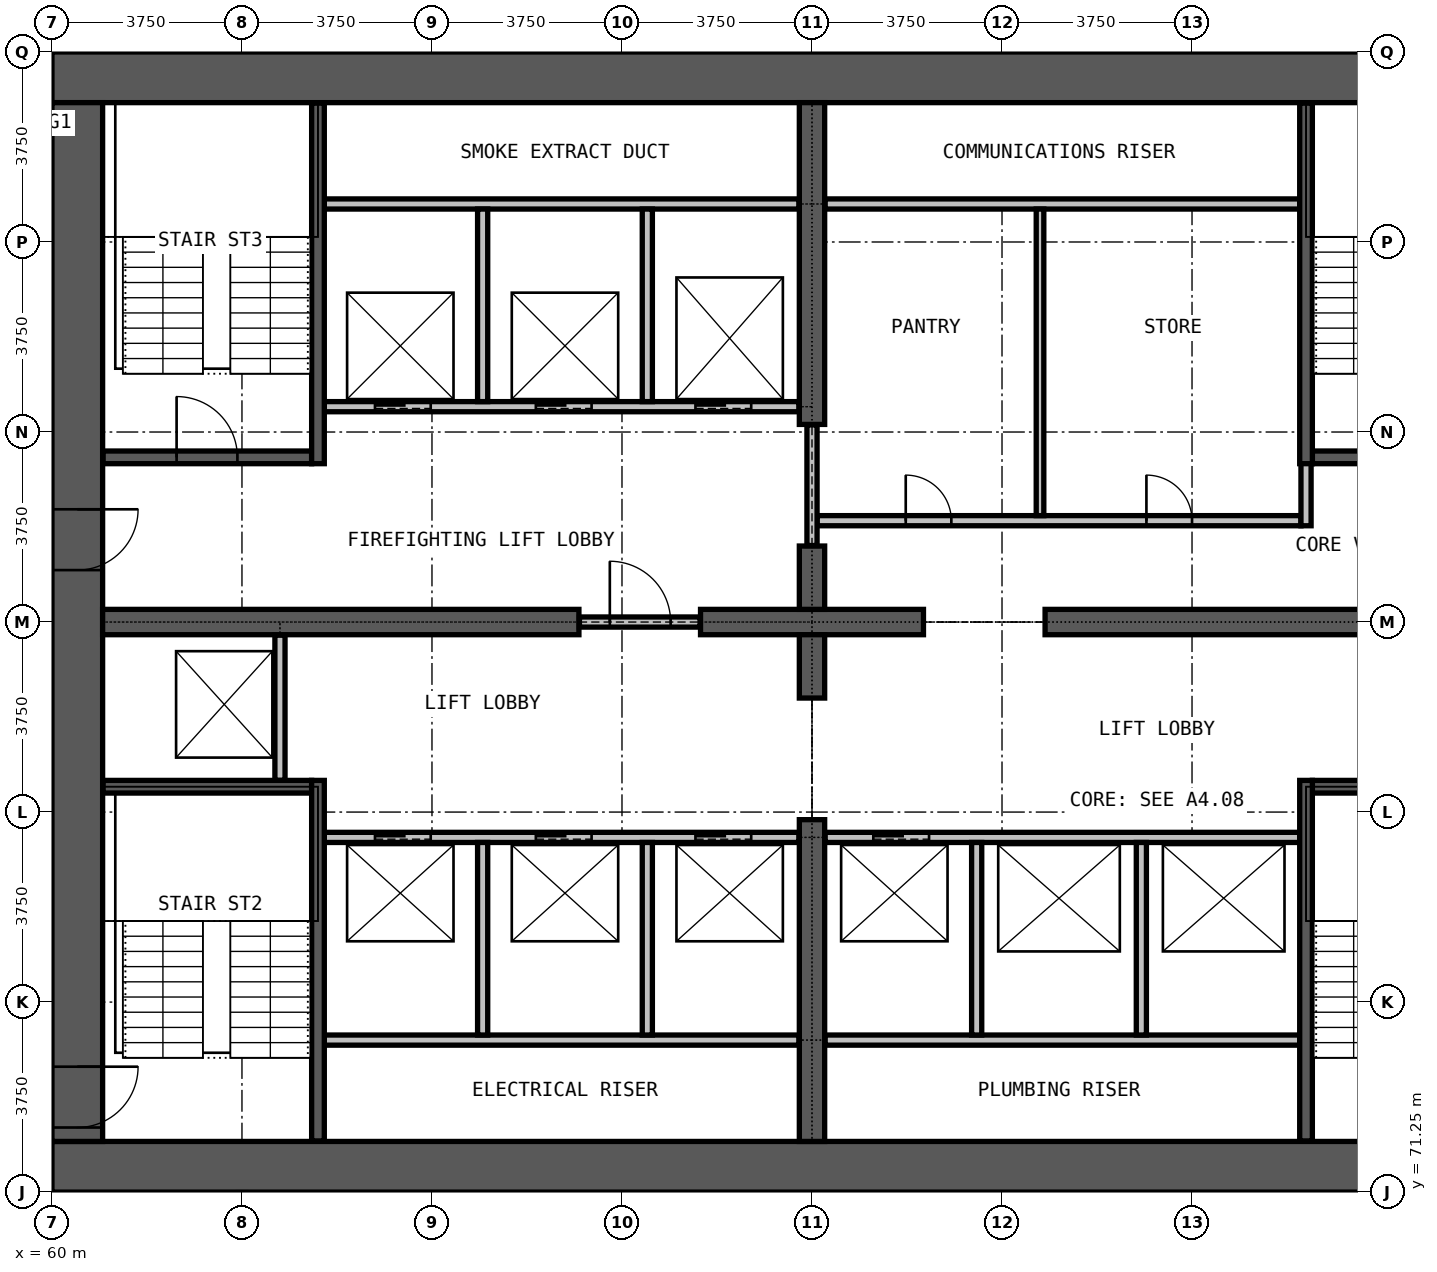
"""IFC4 building model, lengths in metres.
Left out: names, types, materials, properties, quantities, classifications, styles, units other than length and angle.
Written with IfcOpenShell. Run it as: python <this file> out.ifc"""

import sys

from ifc_helpers import new_model, si_unit, direction, frame, frame_2d, origin, place, context, subcontext, project, spatial, rectangle, extrude, element, fill, save


model = new_model("IFC4")
c1 = context("Model", 3, precision=1e-05, world=origin(), true_north=direction((0.0, 1.0)))
c2 = subcontext(c1, "Body", "Model", "MODEL_VIEW")
j1 = project(units=[si_unit("LENGTHUNIT", "METRE"), si_unit("PLANEANGLEUNIT", "RADIAN")], contexts=[c1])
p1 = place(None, origin())
s1 = spatial("IfcSite", under=j1, at=p1, CompositionType="ELEMENT")
p2 = place(p1, origin())
s2 = spatial("IfcBuilding", under=s1, at=p2, CompositionType="ELEMENT")
p3 = place(p2, frame((0.0, 0.0, 42.8)))
s3 = spatial("IfcBuildingStorey", under=s2, at=p3, CompositionType="ELEMENT", Elevation=42.8)
for number, where, z_axis, x_axis in (
    (1, (60.0, 71.75, 0.0), (0.0, 0.0, 1.0), (1.0, 0.0, 0.0)),
    (2, (90.0, 93.25, 0.0), (0.0, 0.0, 1.0), (-1.0, 0.0, 0.0)),
):
    element("IfcWall", number, at=place(p3, frame(where, z_axis=z_axis, x_axis=x_axis)), inside=s3, PredefinedType="SHEAR", context=c2, shape_type="SweptSolid", body=[
        extrude(rectangle(XDim=30.0, YDim=1.0, at=frame_2d((15.0, 0.0))), origin(), (0.0, 0.0, 1.0), 3.3),
    ])
p4 = place(p3, frame((60.5, 92.75, 0.0), z_axis=(0.0, 0.0, 1.0), x_axis=(0.0, -1.0, 0.0)))
e3 = element("IfcWall", 3, at=p4, inside=s3, PredefinedType="SHEAR", context=c2, shape_type="SweptSolid", body=[
    extrude(rectangle(XDim=20.5, YDim=1.0, at=frame_2d((10.25, 0.0))), origin(), (0.0, 0.0, 1.0), 3.3),
])
p5 = place(p4, frame((19.025, 0.0, 0.0)))
e4 = element("IfcOpeningElement", 4, at=p5, cuts=e3, PredefinedType="OPENING", context=c2, shape_type="SweptSolid", body=[
    extrude(rectangle(XDim=1.2, YDim=2.2, at=frame_2d((0.6, 1.1))), frame((0.0, 0.51, 0.0), z_axis=(0.0, -1.0, 0.0), x_axis=(1.0, 0.0, 0.0)), (0.0, 0.0, 1.0), 1.02),
])
p6 = place(p4, frame((8.025, 0.0, 0.0)))
e5 = element("IfcOpeningElement", 5, at=p6, cuts=e3, PredefinedType="OPENING", context=c2, shape_type="SweptSolid", body=[
    extrude(rectangle(XDim=1.2, YDim=2.2, at=frame_2d((0.6, 1.1))), frame((0.0, 0.51, 0.0), z_axis=(0.0, -1.0, 0.0), x_axis=(1.0, 0.0, 0.0)), (0.0, 0.0, 1.0), 1.02),
])
p7 = place(p3, frame((61.0, 82.5, 0.0), z_axis=(0.0, 0.0, 1.0), x_axis=(1.0, 0.0, 0.0)))
e6 = element("IfcWall", 6, at=p7, inside=s3, PredefinedType="SHEAR", context=c2, shape_type="SweptSolid", body=[
    extrude(rectangle(XDim=9.4, YDim=0.5, at=frame_2d((4.7, 0.0))), origin(), (0.0, 0.0, 1.0), 3.3),
])
p8 = place(p3, frame((72.8, 82.5, 0.0), z_axis=(0.0, 0.0, 1.0), x_axis=(1.0, 0.0, 0.0)))
e7 = element("IfcWall", 7, at=p8, inside=s3, PredefinedType="SHEAR", context=c2, shape_type="SweptSolid", body=[
    extrude(rectangle(XDim=4.4, YDim=0.5, at=frame_2d((2.2, 0.0))), origin(), (0.0, 0.0, 1.0), 3.3),
])
p9 = place(p3, frame((79.6, 82.5, 0.0), z_axis=(0.0, 0.0, 1.0), x_axis=(1.0, 0.0, 0.0)))
e8 = element("IfcWall", 8, at=p9, inside=s3, PredefinedType="SHEAR", context=c2, shape_type="SweptSolid", body=[
    extrude(rectangle(XDim=9.4, YDim=0.5, at=frame_2d((4.7, 0.0))), origin(), (0.0, 0.0, 1.0), 3.3),
])
p10 = place(p3, frame((75.0, 72.25, 0.0), z_axis=(0.0, 0.0, 1.0), x_axis=(0.0, 1.0, 0.0)))
e9 = element("IfcWall", 9, at=p10, inside=s3, PredefinedType="SHEAR", context=c2, shape_type="SweptSolid", body=[
    extrude(rectangle(XDim=6.35, YDim=0.5, at=frame_2d((3.175, 0.0))), origin(), (0.0, 0.0, 1.0), 3.3),
])
for number, where, z_axis, x_axis in (
    (10, (75.0, 81.0, 0.0), (0.0, 0.0, 1.0), (0.0, 1.0, 0.0)),
    (11, (75.0, 82.75, 0.0), (0.0, 0.0, 1.0), (0.0, 1.0, 0.0)),
):
    element("IfcWall", number, at=place(p3, frame(where, z_axis=z_axis, x_axis=x_axis)), inside=s3, PredefinedType="SHEAR", context=c2, shape_type="SweptSolid", body=[
        extrude(rectangle(XDim=1.25, YDim=0.5, at=frame_2d((0.625, 0.0))), origin(), (0.0, 0.0, 1.0), 3.3),
    ])
p11 = place(p3, frame((75.0, 86.4, 0.0), z_axis=(0.0, 0.0, 1.0), x_axis=(0.0, 1.0, 0.0)))
e12 = element("IfcWall", 12, at=p11, inside=s3, PredefinedType="SHEAR", context=c2, shape_type="SweptSolid", body=[
    extrude(rectangle(XDim=6.35, YDim=0.5, at=frame_2d((3.175, 0.0))), origin(), (0.0, 0.0, 1.0), 3.3),
])
p12 = place(p3, frame((70.41, 82.5, 0.0), z_axis=(0.0, 0.0, 1.0), x_axis=(1.0, 0.0, 0.0)))
e13 = element("IfcWall", 13, at=p12, inside=s3, PredefinedType="PARTITIONING", context=c2, shape_type="SweptSolid", body=[
    extrude(rectangle(XDim=2.38, YDim=0.2, at=frame_2d((1.19, 0.0))), origin(), (0.0, 0.0, 1.0), 2.4),
])
p13 = place(p12, frame((0.6, 0.0, 0.0)))
e14 = element("IfcOpeningElement", 14, at=p13, cuts=e13, PredefinedType="OPENING", context=c2, shape_type="SweptSolid", body=[
    extrude(rectangle(XDim=1.2, YDim=2.2, at=frame_2d((0.6, 1.1))), frame((0.0, 0.11, 0.0), z_axis=(0.0, -1.0, 0.0), x_axis=(1.0, 0.0, 0.0)), (0.0, 0.0, 1.0), 0.22),
])
p14 = place(p3, frame((75.1, 84.5, 0.0), z_axis=(0.0, 0.0, 1.0), x_axis=(1.0, 0.0, 0.0)))
e15 = element("IfcWall", 15, at=p14, inside=s3, PredefinedType="PARTITIONING", context=c2, shape_type="SweptSolid", body=[
    extrude(rectangle(XDim=9.55, YDim=0.2, at=frame_2d((4.775, 0.0))), origin(), (0.0, 0.0, 1.0), 3.0),
])
p15 = place(p14, frame((1.75, 0.0, 0.0)))
e16 = element("IfcOpeningElement", 16, at=p15, cuts=e15, PredefinedType="OPENING", context=c2, shape_type="SweptSolid", body=[
    extrude(rectangle(XDim=0.9, YDim=2.2, at=frame_2d((0.45, 1.1))), frame((0.0, 0.11, 0.0), z_axis=(0.0, -1.0, 0.0), x_axis=(1.0, 0.0, 0.0)), (0.0, 0.0, 1.0), 0.22),
])
p16 = place(p14, frame((6.5, 0.0, 0.0)))
e17 = element("IfcOpeningElement", 17, at=p16, cuts=e15, PredefinedType="OPENING", context=c2, shape_type="SweptSolid", body=[
    extrude(rectangle(XDim=0.9, YDim=2.2, at=frame_2d((0.45, 1.1))), frame((0.0, 0.11, 0.0), z_axis=(0.0, -1.0, 0.0), x_axis=(1.0, 0.0, 0.0)), (0.0, 0.0, 1.0), 0.22),
])
p17 = place(p3, frame((75.26, 90.75, 0.0), z_axis=(0.0, 0.0, 1.0), x_axis=(1.0, 0.0, 0.0)))
e18 = element("IfcWall", 18, at=p17, inside=s3, PredefinedType="PARTITIONING", context=c2, shape_type="SweptSolid", body=[
    extrude(rectangle(XDim=9.365, YDim=0.2, at=frame_2d((4.683, 0.0))), origin(), (0.0, 0.0, 1.0), 3.0),
])
p18 = place(p3, frame((75.0, 84.01, 0.0), z_axis=(0.0, 0.0, 1.0), x_axis=(0.0, 1.0, 0.0)))
e19 = element("IfcWall", 19, at=p18, inside=s3, PredefinedType="PARTITIONING", context=c2, shape_type="SweptSolid", body=[
    extrude(rectangle(XDim=2.38, YDim=0.2, at=frame_2d((1.19, 0.0))), origin(), (0.0, 0.0, 1.0), 2.4),
])
p19 = place(p3, frame((84.75, 84.4, 0.0), z_axis=(0.0, 0.0, 1.0), x_axis=(0.0, 1.0, 0.0)))
e20 = element("IfcWall", 20, at=p19, inside=s3, PredefinedType="PARTITIONING", context=c2, shape_type="SweptSolid", body=[
    extrude(rectangle(XDim=1.475, YDim=0.2, at=frame_2d((0.738, 0.0))), origin(), (0.0, 0.0, 1.0), 3.0),
])
p20 = place(p3, frame((79.5, 84.6, 0.0), z_axis=(0.0, 0.0, 1.0), x_axis=(0.0, 1.0, 0.0)))
e21 = element("IfcWall", 21, at=p20, inside=s3, PredefinedType="PARTITIONING", context=c2, shape_type="SweptSolid", body=[
    extrude(rectangle(XDim=6.05, YDim=0.15, at=frame_2d((3.025, 0.0))), origin(), (0.0, 0.0, 1.0), 3.0),
])
for number, where, z_axis, x_axis in (
    (22, (65.375, 74.25, 0.0), (0.0, 0.0, 1.0), (1.0, 0.0, 0.0)),
    (23, (75.26, 74.25, 0.0), (0.0, 0.0, 1.0), (1.0, 0.0, 0.0)),
):
    element("IfcWall", number, at=place(p3, frame(where, z_axis=z_axis, x_axis=x_axis)), inside=s3, PredefinedType="PARTITIONING", context=c2, shape_type="SweptSolid", body=[
        extrude(rectangle(XDim=9.365, YDim=0.2, at=frame_2d((4.683, 0.0))), origin(), (0.0, 0.0, 1.0), 3.0),
    ])
p21 = place(p3, frame((65.375, 78.25, 0.0), z_axis=(0.0, 0.0, 1.0), x_axis=(1.0, 0.0, 0.0)))
e24 = element("IfcWall", 24, at=p21, inside=s3, PredefinedType="PARTITIONING", context=c2, shape_type="SweptSolid", body=[
    extrude(rectangle(XDim=9.365, YDim=0.2, at=frame_2d((4.683, 0.0))), origin(), (0.0, 0.0, 1.0), 3.0),
])
p22 = place(p21, frame((1.0, 0.0, 0.0)))
e25 = element("IfcOpeningElement", 25, at=p22, cuts=e24, PredefinedType="OPENING", context=c2, shape_type="SweptSolid", body=[
    extrude(rectangle(XDim=1.1, YDim=2.2, at=frame_2d((0.55, 1.1))), frame((0.0, 0.11, 0.0), z_axis=(0.0, -1.0, 0.0), x_axis=(1.0, 0.0, 0.0)), (0.0, 0.0, 1.0), 0.22),
])
p23 = place(p21, frame((4.175, 0.0, 0.0)))
e26 = element("IfcOpeningElement", 26, at=p23, cuts=e24, PredefinedType="OPENING", context=c2, shape_type="SweptSolid", body=[
    extrude(rectangle(XDim=1.1, YDim=2.2, at=frame_2d((0.55, 1.1))), frame((0.0, 0.11, 0.0), z_axis=(0.0, -1.0, 0.0), x_axis=(1.0, 0.0, 0.0)), (0.0, 0.0, 1.0), 0.22),
])
p24 = place(p21, frame((7.325, 0.0, 0.0)))
e27 = element("IfcOpeningElement", 27, at=p24, cuts=e24, PredefinedType="OPENING", context=c2, shape_type="SweptSolid", body=[
    extrude(rectangle(XDim=1.1, YDim=2.2, at=frame_2d((0.55, 1.1))), frame((0.0, 0.11, 0.0), z_axis=(0.0, -1.0, 0.0), x_axis=(1.0, 0.0, 0.0)), (0.0, 0.0, 1.0), 0.22),
])
p25 = place(p3, frame((75.26, 78.25, 0.0), z_axis=(0.0, 0.0, 1.0), x_axis=(1.0, 0.0, 0.0)))
e28 = element("IfcWall", 28, at=p25, inside=s3, PredefinedType="PARTITIONING", context=c2, shape_type="SweptSolid", body=[
    extrude(rectangle(XDim=9.365, YDim=0.2, at=frame_2d((4.683, 0.0))), origin(), (0.0, 0.0, 1.0), 3.0),
])
p26 = place(p25, frame((0.95, 0.0, 0.0)))
e29 = element("IfcOpeningElement", 29, at=p26, cuts=e28, PredefinedType="OPENING", context=c2, shape_type="SweptSolid", body=[
    extrude(rectangle(XDim=1.1, YDim=2.2, at=frame_2d((0.55, 1.1))), frame((0.0, 0.11, 0.0), z_axis=(0.0, -1.0, 0.0), x_axis=(1.0, 0.0, 0.0)), (0.0, 0.0, 1.0), 0.22),
])
p27 = place(p3, frame((65.375, 86.75, 0.0), z_axis=(0.0, 0.0, 1.0), x_axis=(1.0, 0.0, 0.0)))
e30 = element("IfcWall", 30, at=p27, inside=s3, PredefinedType="PARTITIONING", context=c2, shape_type="SweptSolid", body=[
    extrude(rectangle(XDim=9.365, YDim=0.2, at=frame_2d((4.683, 0.0))), origin(), (0.0, 0.0, 1.0), 3.0),
])
p28 = place(p27, frame((1.0, 0.0, 0.0)))
e31 = element("IfcOpeningElement", 31, at=p28, cuts=e30, PredefinedType="OPENING", context=c2, shape_type="SweptSolid", body=[
    extrude(rectangle(XDim=1.1, YDim=2.2, at=frame_2d((0.55, 1.1))), frame((0.0, 0.11, 0.0), z_axis=(0.0, -1.0, 0.0), x_axis=(1.0, 0.0, 0.0)), (0.0, 0.0, 1.0), 0.22),
])
p29 = place(p27, frame((4.175, 0.0, 0.0)))
e32 = element("IfcOpeningElement", 32, at=p29, cuts=e30, PredefinedType="OPENING", context=c2, shape_type="SweptSolid", body=[
    extrude(rectangle(XDim=1.1, YDim=2.2, at=frame_2d((0.55, 1.1))), frame((0.0, 0.11, 0.0), z_axis=(0.0, -1.0, 0.0), x_axis=(1.0, 0.0, 0.0)), (0.0, 0.0, 1.0), 0.22),
])
p30 = place(p27, frame((7.325, 0.0, 0.0)))
e33 = element("IfcOpeningElement", 33, at=p30, cuts=e30, PredefinedType="OPENING", context=c2, shape_type="SweptSolid", body=[
    extrude(rectangle(XDim=1.1, YDim=2.2, at=frame_2d((0.55, 1.1))), frame((0.0, 0.11, 0.0), z_axis=(0.0, -1.0, 0.0), x_axis=(1.0, 0.0, 0.0)), (0.0, 0.0, 1.0), 0.22),
])
p31 = place(p3, frame((65.375, 90.75, 0.0), z_axis=(0.0, 0.0, 1.0), x_axis=(1.0, 0.0, 0.0)))
e34 = element("IfcWall", 34, at=p31, inside=s3, PredefinedType="PARTITIONING", context=c2, shape_type="SweptSolid", body=[
    extrude(rectangle(XDim=9.365, YDim=0.2, at=frame_2d((4.683, 0.0))), origin(), (0.0, 0.0, 1.0), 3.0),
])
p32 = place(p3, frame((64.5, 79.375, 0.0), z_axis=(0.0, 0.0, 1.0), x_axis=(0.0, 1.0, 0.0)))
e35 = element("IfcWall", 35, at=p32, inside=s3, PredefinedType="PARTITIONING", context=c2, shape_type="SweptSolid", body=[
    extrude(rectangle(XDim=2.865, YDim=0.2, at=frame_2d((1.433, 0.0))), origin(), (0.0, 0.0, 1.0), 3.0),
])
for number, where, z_axis, x_axis in (
    (36, (68.5, 74.35, 0.0), (0.0, 0.0, 1.0), (0.0, 1.0, 0.0)),
    (37, (68.5, 86.85, 0.0), (0.0, 0.0, 1.0), (0.0, 1.0, 0.0)),
    (38, (71.75, 74.35, 0.0), (0.0, 0.0, 1.0), (0.0, 1.0, 0.0)),
    (39, (71.75, 86.85, 0.0), (0.0, 0.0, 1.0), (0.0, 1.0, 0.0)),
    (40, (78.25, 74.35, 0.0), (0.0, 0.0, 1.0), (0.0, 1.0, 0.0)),
    (41, (81.5, 74.35, 0.0), (0.0, 0.0, 1.0), (0.0, 1.0, 0.0)),
):
    element("IfcWall", number, at=place(p3, frame(where, z_axis=z_axis, x_axis=x_axis)), inside=s3, PredefinedType="PARTITIONING", context=c2, shape_type="SweptSolid", body=[
        extrude(rectangle(XDim=3.8, YDim=0.2, at=frame_2d((1.9, 0.0))), origin(), (0.0, 0.0, 1.0), 3.0),
    ])
for number, where, z_axis, x_axis in (
    (42, (61.01, 79.25, 0.0), (0.0, 0.0, 1.0), (1.0, 0.0, 0.0)),
    (43, (84.875, 79.25, 0.0), (0.0, 0.0, 1.0), (1.0, 0.0, 0.0)),
):
    element("IfcWall", number, at=place(p3, frame(where, z_axis=z_axis, x_axis=x_axis)), inside=s3, PredefinedType="PARTITIONING", context=c2, shape_type="SweptSolid", body=[
        extrude(rectangle(XDim=4.115, YDim=0.25, at=frame_2d((2.058, 0.0))), origin(), (0.0, 0.0, 1.0), 3.0),
    ])
p33 = place(p3, frame((61.01, 85.75, 0.0), z_axis=(0.0, 0.0, 1.0), x_axis=(1.0, 0.0, 0.0)))
e44 = element("IfcWall", 44, at=p33, inside=s3, PredefinedType="PARTITIONING", context=c2, shape_type="SweptSolid", body=[
    extrude(rectangle(XDim=4.115, YDim=0.25, at=frame_2d((2.058, 0.0))), origin(), (0.0, 0.0, 1.0), 3.0),
])
p34 = place(p33, frame((1.45, 0.0, 0.0)))
e45 = element("IfcOpeningElement", 45, at=p34, cuts=e44, PredefinedType="OPENING", context=c2, shape_type="SweptSolid", body=[
    extrude(rectangle(XDim=1.2, YDim=2.2, at=frame_2d((0.6, 1.1))), frame((0.0, 0.135, 0.0), z_axis=(0.0, -1.0, 0.0), x_axis=(1.0, 0.0, 0.0)), (0.0, 0.0, 1.0), 0.27),
])
p35 = place(p3, frame((84.875, 85.75, 0.0), z_axis=(0.0, 0.0, 1.0), x_axis=(1.0, 0.0, 0.0)))
e46 = element("IfcWall", 46, at=p35, inside=s3, PredefinedType="PARTITIONING", context=c2, shape_type="SweptSolid", body=[
    extrude(rectangle(XDim=4.115, YDim=0.25, at=frame_2d((2.058, 0.0))), origin(), (0.0, 0.0, 1.0), 3.0),
])
for number, where, z_axis, x_axis in (
    (47, (65.25, 72.26, 0.0), (0.0, 0.0, 1.0), (0.0, 1.0, 0.0)),
    (48, (65.25, 85.625, 0.0), (0.0, 0.0, 1.0), (0.0, 1.0, 0.0)),
    (49, (84.75, 72.26, 0.0), (0.0, 0.0, 1.0), (0.0, 1.0, 0.0)),
    (50, (84.75, 85.625, 0.0), (0.0, 0.0, 1.0), (0.0, 1.0, 0.0)),
):
    element("IfcWall", number, at=place(p3, frame(where, z_axis=z_axis, x_axis=x_axis)), inside=s3, PredefinedType="PARTITIONING", context=c2, shape_type="SweptSolid", body=[
        extrude(rectangle(XDim=7.115, YDim=0.25, at=frame_2d((3.558, 0.0))), origin(), (0.0, 0.0, 1.0), 3.0),
    ])
p36 = place(p22, origin())
e51 = element("IfcDoor", 51, at=p36, inside=s3, OperationType="DOUBLE_DOOR_SLIDING", PredefinedType="DOOR", context=c2, shape_type="SweptSolid", body=[
    extrude(rectangle(XDim=1.1, YDim=2.2, at=frame_2d((0.55, 1.1))), frame((0.0, 0.025, 0.0), z_axis=(0.0, -1.0, 0.0), x_axis=(1.0, 0.0, 0.0)), (0.0, 0.0, 1.0), 0.05),
])
fill(e25, e51)
p37 = place(p23, origin())
e52 = element("IfcDoor", 52, at=p37, inside=s3, OperationType="DOUBLE_DOOR_SLIDING", PredefinedType="DOOR", context=c2, shape_type="SweptSolid", body=[
    extrude(rectangle(XDim=1.1, YDim=2.2, at=frame_2d((0.55, 1.1))), frame((0.0, 0.025, 0.0), z_axis=(0.0, -1.0, 0.0), x_axis=(1.0, 0.0, 0.0)), (0.0, 0.0, 1.0), 0.05),
])
fill(e26, e52)
p38 = place(p24, origin())
e53 = element("IfcDoor", 53, at=p38, inside=s3, OperationType="DOUBLE_DOOR_SLIDING", PredefinedType="DOOR", context=c2, shape_type="SweptSolid", body=[
    extrude(rectangle(XDim=1.1, YDim=2.2, at=frame_2d((0.55, 1.1))), frame((0.0, 0.025, 0.0), z_axis=(0.0, -1.0, 0.0), x_axis=(1.0, 0.0, 0.0)), (0.0, 0.0, 1.0), 0.05),
])
fill(e27, e53)
p39 = place(p26, origin())
e54 = element("IfcDoor", 54, at=p39, inside=s3, OperationType="DOUBLE_DOOR_SLIDING", PredefinedType="DOOR", context=c2, shape_type="SweptSolid", body=[
    extrude(rectangle(XDim=1.1, YDim=2.2, at=frame_2d((0.55, 1.1))), frame((0.0, 0.025, 0.0), z_axis=(0.0, -1.0, 0.0), x_axis=(1.0, 0.0, 0.0)), (0.0, 0.0, 1.0), 0.05),
])
fill(e29, e54)
p40 = place(p28, origin())
e55 = element("IfcDoor", 55, at=p40, inside=s3, OperationType="DOUBLE_DOOR_SLIDING", PredefinedType="DOOR", context=c2, shape_type="SweptSolid", body=[
    extrude(rectangle(XDim=1.1, YDim=2.2, at=frame_2d((0.55, 1.1))), frame((0.0, 0.025, 0.0), z_axis=(0.0, -1.0, 0.0), x_axis=(1.0, 0.0, 0.0)), (0.0, 0.0, 1.0), 0.05),
])
fill(e31, e55)
p41 = place(p29, origin())
e56 = element("IfcDoor", 56, at=p41, inside=s3, OperationType="DOUBLE_DOOR_SLIDING", PredefinedType="DOOR", context=c2, shape_type="SweptSolid", body=[
    extrude(rectangle(XDim=1.1, YDim=2.2, at=frame_2d((0.55, 1.1))), frame((0.0, 0.025, 0.0), z_axis=(0.0, -1.0, 0.0), x_axis=(1.0, 0.0, 0.0)), (0.0, 0.0, 1.0), 0.05),
])
fill(e32, e56)
p42 = place(p30, origin())
e57 = element("IfcDoor", 57, at=p42, inside=s3, OperationType="DOUBLE_DOOR_SLIDING", PredefinedType="DOOR", context=c2, shape_type="SweptSolid", body=[
    extrude(rectangle(XDim=1.1, YDim=2.2, at=frame_2d((0.55, 1.1))), frame((0.0, 0.025, 0.0), z_axis=(0.0, -1.0, 0.0), x_axis=(1.0, 0.0, 0.0)), (0.0, 0.0, 1.0), 0.05),
])
fill(e33, e57)
p43 = place(p13, origin())
e58 = element("IfcDoor", 58, at=p43, inside=s3, OperationType="SINGLE_SWING_RIGHT", PredefinedType="DOOR", context=c2, shape_type="SweptSolid", body=[
    extrude(rectangle(XDim=1.2, YDim=2.2, at=frame_2d((0.6, 1.1))), frame((0.0, 0.025, 0.0), z_axis=(0.0, -1.0, 0.0), x_axis=(1.0, 0.0, 0.0)), (0.0, 0.0, 1.0), 0.05),
])
fill(e14, e58)
p44 = place(p34, origin())
e59 = element("IfcDoor", 59, at=p44, inside=s3, OperationType="SINGLE_SWING_LEFT", PredefinedType="DOOR", context=c2, shape_type="SweptSolid", body=[
    extrude(rectangle(XDim=1.2, YDim=2.2, at=frame_2d((0.6, 1.1))), frame((0.0, 0.025, 0.0), z_axis=(0.0, -1.0, 0.0), x_axis=(1.0, 0.0, 0.0)), (0.0, 0.0, 1.0), 0.05),
])
fill(e45, e59)
p45 = place(p5, origin())
e60 = element("IfcDoor", 60, at=p45, inside=s3, OperationType="SINGLE_SWING_LEFT", PredefinedType="DOOR", context=c2, shape_type="SweptSolid", body=[
    extrude(rectangle(XDim=1.2, YDim=2.2, at=frame_2d((0.6, 1.1))), frame((0.0, 0.025, 0.0), z_axis=(0.0, -1.0, 0.0), x_axis=(1.0, 0.0, 0.0)), (0.0, 0.0, 1.0), 0.05),
])
fill(e4, e60)
p46 = place(p6, origin())
e61 = element("IfcDoor", 61, at=p46, inside=s3, OperationType="SINGLE_SWING_LEFT", PredefinedType="DOOR", context=c2, shape_type="SweptSolid", body=[
    extrude(rectangle(XDim=1.2, YDim=2.2, at=frame_2d((0.6, 1.1))), frame((0.0, 0.025, 0.0), z_axis=(0.0, -1.0, 0.0), x_axis=(1.0, 0.0, 0.0)), (0.0, 0.0, 1.0), 0.05),
])
fill(e5, e61)
p47 = place(p15, origin())
e62 = element("IfcDoor", 62, at=p47, inside=s3, OperationType="SINGLE_SWING_LEFT", PredefinedType="DOOR", context=c2, shape_type="SweptSolid", body=[
    extrude(rectangle(XDim=0.9, YDim=2.2, at=frame_2d((0.45, 1.1))), frame((0.0, 0.025, 0.0), z_axis=(0.0, -1.0, 0.0), x_axis=(1.0, 0.0, 0.0)), (0.0, 0.0, 1.0), 0.05),
])
fill(e16, e62)
p48 = place(p16, origin())
e63 = element("IfcDoor", 63, at=p48, inside=s3, OperationType="SINGLE_SWING_RIGHT", PredefinedType="DOOR", context=c2, shape_type="SweptSolid", body=[
    extrude(rectangle(XDim=0.9, YDim=2.2, at=frame_2d((0.45, 1.1))), frame((0.0, 0.025, 0.0), z_axis=(0.0, -1.0, 0.0), x_axis=(1.0, 0.0, 0.0)), (0.0, 0.0, 1.0), 0.05),
])
fill(e17, e63)
save(model, sys.argv[1])
